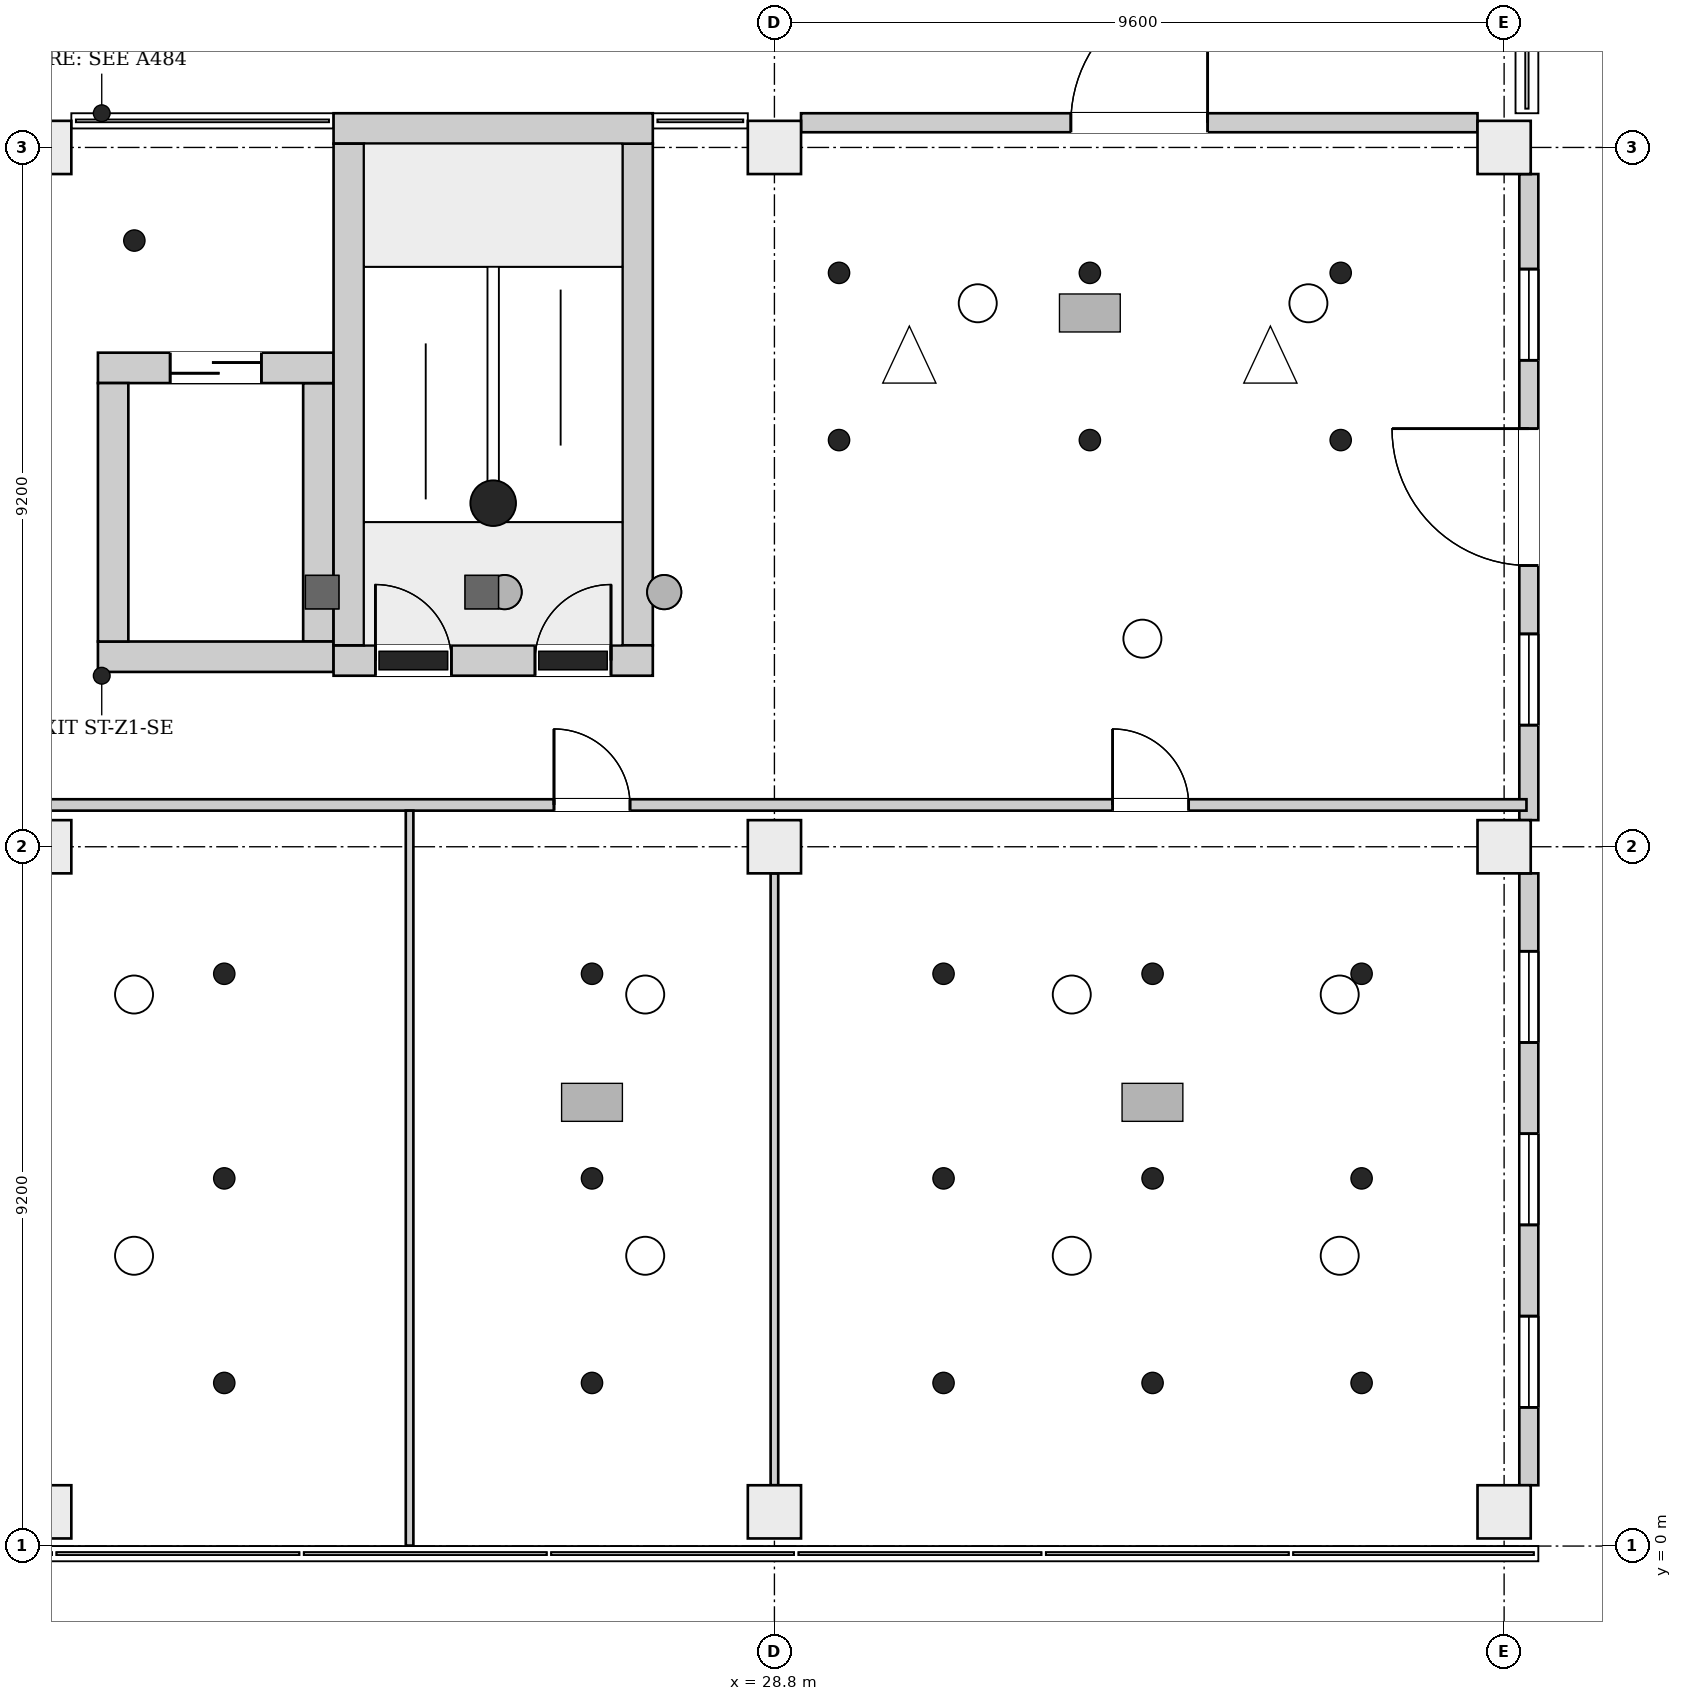
"""IFC4 building model, lengths in metres.
Left out: names, types, materials, properties, quantities, classifications, styles, units other than length and angle.
Written with IfcOpenShell. Run it as: python <this file> out.ifc"""

import sys

from ifc_helpers import new_model, si_unit, direction, frame, frame_2d, origin, origin_2d, place, context, subcontext, project, spatial, rectangle, extrude, element, fill, save


model = new_model("IFC4")
c1 = context("Model", 3, precision=1e-05, world=origin(), true_north=direction((0.0, 1.0)))
c2 = subcontext(c1, "Body", "Model", "MODEL_VIEW")
j1 = project(units=[si_unit("LENGTHUNIT", "METRE"), si_unit("PLANEANGLEUNIT", "RADIAN")], contexts=[c1])
p1 = place(None, origin())
s1 = spatial("IfcSite", under=j1, at=p1, CompositionType="ELEMENT")
p2 = place(p1, origin())
s2 = spatial("IfcBuilding", under=s1, at=p2, CompositionType="ELEMENT")
p3 = place(p2, frame((0.0, 0.0, 69.7)))
s3 = spatial("IfcBuildingStorey", under=s2, at=p3, CompositionType="ELEMENT", Elevation=69.7)
p4 = place(p3, frame((23.0, 11.65, 0.0), z_axis=(0.0, 0.0, 1.0), x_axis=(1.0, 0.0, 0.0)))
e1 = element("IfcWall", 1, at=p4, inside=s3, PredefinedType="SHEAR", context=c2, shape_type="SweptSolid", body=[
    extrude(rectangle(XDim=4.2, YDim=0.4, at=frame_2d((2.1, 0.0))), origin(), (0.0, 0.0, 1.0), 4.2),
])
p5 = place(p4, frame((0.55, 0.0, 0.0)))
e2 = element("IfcOpeningElement", 2, at=p5, cuts=e1, PredefinedType="OPENING", context=c2, shape_type="SweptSolid", body=[
    extrude(rectangle(XDim=1.0, YDim=2.1, at=frame_2d((0.5, 1.05))), frame((0.0, 0.21, 0.0), z_axis=(0.0, -1.0, 0.0), x_axis=(1.0, 0.0, 0.0)), (0.0, 0.0, 1.0), 0.42),
])
p6 = place(p4, frame((2.65, 0.0, 0.0)))
e3 = element("IfcOpeningElement", 3, at=p6, cuts=e1, PredefinedType="OPENING", context=c2, shape_type="SweptSolid", body=[
    extrude(rectangle(XDim=1.0, YDim=2.1, at=frame_2d((0.5, 1.05))), frame((0.0, 0.21, 0.0), z_axis=(0.0, -1.0, 0.0), x_axis=(1.0, 0.0, 0.0)), (0.0, 0.0, 1.0), 0.42),
])
p7 = place(p3, frame((23.0, 18.65, 0.0), z_axis=(0.0, 0.0, 1.0), x_axis=(1.0, 0.0, 0.0)))
e4 = element("IfcWall", 4, at=p7, inside=s3, PredefinedType="SHEAR", context=c2, shape_type="SweptSolid", body=[
    extrude(rectangle(XDim=4.2, YDim=0.4, at=frame_2d((2.1, 0.0))), origin(), (0.0, 0.0, 1.0), 4.2),
])
for number, where, z_axis, x_axis in (
    (5, (23.2, 11.85, 0.0), (0.0, 0.0, 1.0), (0.0, 1.0, 0.0)),
    (6, (27.0, 11.85, 0.0), (0.0, 0.0, 1.0), (0.0, 1.0, 0.0)),
):
    element("IfcWall", number, at=place(p3, frame(where, z_axis=z_axis, x_axis=x_axis)), inside=s3, PredefinedType="SHEAR", context=c2, shape_type="SweptSolid", body=[
        extrude(rectangle(XDim=6.6, YDim=0.4, at=frame_2d((3.3, 0.0))), origin(), (0.0, 0.0, 1.0), 4.2),
    ])
p8 = place(p3, frame((19.9, 11.7, 0.0), z_axis=(0.0, 0.0, 1.0), x_axis=(1.0, 0.0, 0.0)))
e7 = element("IfcWall", 7, at=p8, inside=s3, PredefinedType="SHEAR", context=c2, shape_type="SweptSolid", body=[
    extrude(rectangle(XDim=3.1, YDim=0.4, at=frame_2d((1.55, 0.0))), origin(), (0.0, 0.0, 1.0), 4.2),
])
p9 = place(p3, frame((19.9, 15.5, 0.0), z_axis=(0.0, 0.0, 1.0), x_axis=(1.0, 0.0, 0.0)))
e8 = element("IfcWall", 8, at=p9, inside=s3, PredefinedType="SHEAR", context=c2, shape_type="SweptSolid", body=[
    extrude(rectangle(XDim=3.1, YDim=0.4, at=frame_2d((1.55, 0.0))), origin(), (0.0, 0.0, 1.0), 4.2),
])
p10 = place(p9, frame((0.95, 0.0, 0.0)))
e9 = element("IfcOpeningElement", 9, at=p10, cuts=e8, PredefinedType="OPENING", context=c2, shape_type="SweptSolid", body=[
    extrude(rectangle(XDim=1.2, YDim=2.1, at=frame_2d((0.6, 1.05))), frame((0.0, 0.21, 0.0), z_axis=(0.0, -1.0, 0.0), x_axis=(1.0, 0.0, 0.0)), (0.0, 0.0, 1.0), 0.42),
])
for number, where, z_axis, x_axis in (
    (10, (20.1, 11.9, 0.0), (0.0, 0.0, 1.0), (0.0, 1.0, 0.0)),
    (11, (22.8, 11.9, 0.0), (0.0, 0.0, 1.0), (0.0, 1.0, 0.0)),
):
    element("IfcWall", number, at=place(p3, frame(where, z_axis=z_axis, x_axis=x_axis)), inside=s3, PredefinedType="SHEAR", context=c2, shape_type="SweptSolid", body=[
        extrude(rectangle(XDim=3.4, YDim=0.4, at=frame_2d((1.7, 0.0))), origin(), (0.0, 0.0, 1.0), 4.2),
    ])
for number, where, z_axis, x_axis in (
    (12, (19.2, 0.45, 0.0), (0.0, 0.0, 1.0), (1.0, 0.0, 0.0)),
    (13, (28.8, 0.45, 0.0), (0.0, 0.0, 1.0), (1.0, 0.0, 0.0)),
    (14, (38.4, 0.45, 0.0), (0.0, 0.0, 1.0), (1.0, 0.0, 0.0)),
    (15, (19.2, 9.2, 0.0), (0.0, 0.0, 1.0), (1.0, 0.0, 0.0)),
    (16, (28.8, 9.2, 0.0), (0.0, 0.0, 1.0), (1.0, 0.0, 0.0)),
    (17, (38.4, 9.2, 0.0), (0.0, 0.0, 1.0), (1.0, 0.0, 0.0)),
    (18, (19.2, 18.4, 0.0), (0.0, 0.0, 1.0), (1.0, 0.0, 0.0)),
    (19, (28.8, 18.4, 0.0), (0.0, 0.0, 1.0), (1.0, 0.0, 0.0)),
    (20, (38.4, 18.4, 0.0), (0.0, 0.0, 1.0), (1.0, 0.0, 0.0)),
):
    element("IfcColumn", number, at=place(p3, frame(where, z_axis=z_axis, x_axis=x_axis)), inside=s3, PredefinedType="COLUMN", context=c2, shape_type="SweptSolid", body=[
        extrude(rectangle(XDim=0.7, YDim=0.7, at=origin_2d()), origin(), (0.0, 0.0, 1.0), 4.2),
    ])
p11 = place(p3, frame((38.05, 18.725, 0.0), z_axis=(0.0, 0.0, 1.0), x_axis=(-1.0, 0.0, 0.0)))
e21 = element("IfcWall", 21, at=p11, inside=s3, PredefinedType="ELEMENTEDWALL", context=c2, shape_type="SweptSolid", body=[
    extrude(rectangle(XDim=8.9, YDim=0.25, at=frame_2d((4.45, 0.0))), origin(), (0.0, 0.0, 1.0), 3.9),
])
p12 = place(p11, frame((3.55, 0.0, 0.0)))
e22 = element("IfcOpeningElement", 22, at=p12, cuts=e21, PredefinedType="OPENING", context=c2, shape_type="SweptSolid", body=[
    extrude(rectangle(XDim=1.8, YDim=2.4, at=frame_2d((0.9, 1.2))), frame((0.0, 0.135, 0.0), z_axis=(0.0, -1.0, 0.0), x_axis=(1.0, 0.0, 0.0)), (0.0, 0.0, 1.0), 0.27),
])
p13 = place(p3, frame((38.725, 0.8, 0.0), z_axis=(0.0, 0.0, 1.0), x_axis=(0.0, 1.0, 0.0)))
e23 = element("IfcWall", 23, at=p13, inside=s3, PredefinedType="ELEMENTEDWALL", context=c2, shape_type="SweptSolid", body=[
    extrude(rectangle(XDim=8.05, YDim=0.25, at=frame_2d((4.025, 0.0))), origin(), (0.0, 0.0, 1.0), 3.9),
])
p14 = place(p13, frame((1.025, 0.0, 0.9)))
e24 = element("IfcOpeningElement", 24, at=p14, cuts=e23, PredefinedType="OPENING", context=c2, shape_type="SweptSolid", body=[
    extrude(rectangle(XDim=1.2, YDim=2.6, at=frame_2d((0.6, 1.3))), frame((0.0, 0.135, 0.0), z_axis=(0.0, -1.0, 0.0), x_axis=(1.0, 0.0, 0.0)), (0.0, 0.0, 1.0), 0.27),
])
p15 = place(p13, frame((3.425, 0.0, 0.9)))
e25 = element("IfcOpeningElement", 25, at=p15, cuts=e23, PredefinedType="OPENING", context=c2, shape_type="SweptSolid", body=[
    extrude(rectangle(XDim=1.2, YDim=2.6, at=frame_2d((0.6, 1.3))), frame((0.0, 0.135, 0.0), z_axis=(0.0, -1.0, 0.0), x_axis=(1.0, 0.0, 0.0)), (0.0, 0.0, 1.0), 0.27),
])
p16 = place(p13, frame((5.825, 0.0, 0.9)))
e26 = element("IfcOpeningElement", 26, at=p16, cuts=e23, PredefinedType="OPENING", context=c2, shape_type="SweptSolid", body=[
    extrude(rectangle(XDim=1.2, YDim=2.6, at=frame_2d((0.6, 1.3))), frame((0.0, 0.135, 0.0), z_axis=(0.0, -1.0, 0.0), x_axis=(1.0, 0.0, 0.0)), (0.0, 0.0, 1.0), 0.27),
])
p17 = place(p3, frame((38.725, 9.55, 0.0), z_axis=(0.0, 0.0, 1.0), x_axis=(0.0, 1.0, 0.0)))
e27 = element("IfcWall", 27, at=p17, inside=s3, PredefinedType="ELEMENTEDWALL", context=c2, shape_type="SweptSolid", body=[
    extrude(rectangle(XDim=8.5, YDim=0.25, at=frame_2d((4.25, 0.0))), origin(), (0.0, 0.0, 1.0), 3.9),
])
p18 = place(p17, frame((3.35, 0.0, 0.0)))
e28 = element("IfcOpeningElement", 28, at=p18, cuts=e27, PredefinedType="OPENING", context=c2, shape_type="SweptSolid", body=[
    extrude(rectangle(XDim=1.8, YDim=2.4, at=frame_2d((0.9, 1.2))), frame((0.0, 0.135, 0.0), z_axis=(0.0, -1.0, 0.0), x_axis=(1.0, 0.0, 0.0)), (0.0, 0.0, 1.0), 0.27),
])
p19 = place(p17, frame((1.25, 0.0, 0.9)))
e29 = element("IfcOpeningElement", 29, at=p19, cuts=e27, PredefinedType="OPENING", context=c2, shape_type="SweptSolid", body=[
    extrude(rectangle(XDim=1.2, YDim=2.6, at=frame_2d((0.6, 1.3))), frame((0.0, 0.135, 0.0), z_axis=(0.0, -1.0, 0.0), x_axis=(1.0, 0.0, 0.0)), (0.0, 0.0, 1.0), 0.27),
])
p20 = place(p17, frame((6.05, 0.0, 0.9)))
e30 = element("IfcOpeningElement", 30, at=p20, cuts=e27, PredefinedType="OPENING", context=c2, shape_type="SweptSolid", body=[
    extrude(rectangle(XDim=1.2, YDim=2.6, at=frame_2d((0.6, 1.3))), frame((0.0, 0.135, 0.0), z_axis=(0.0, -1.0, 0.0), x_axis=(1.0, 0.0, 0.0)), (0.0, 0.0, 1.0), 0.27),
])
p21 = place(p3, frame((4.325, 9.75, 0.0), z_axis=(0.0, 0.0, 1.0), x_axis=(1.0, 0.0, 0.0)))
e31 = element("IfcWall", 31, at=p21, inside=s3, PredefinedType="PARTITIONING", context=c2, shape_type="SweptSolid", body=[
    extrude(rectangle(XDim=34.369, YDim=0.15, at=frame_2d((17.185, 0.0))), origin(), (0.0, 0.0, 1.0), 3.9),
])
p22 = place(p21, frame((2.175, 0.0, 0.0)))
e32 = element("IfcOpeningElement", 32, at=p22, cuts=e31, PredefinedType="OPENING", context=c2, shape_type="SweptSolid", body=[
    extrude(rectangle(XDim=1.0, YDim=2.1, at=frame_2d((0.5, 1.05))), frame((0.0, 0.085, 0.0), z_axis=(0.0, -1.0, 0.0), x_axis=(1.0, 0.0, 0.0)), (0.0, 0.0, 1.0), 0.17),
])
p23 = place(p21, frame((11.975, 0.0, 0.0)))
e33 = element("IfcOpeningElement", 33, at=p23, cuts=e31, PredefinedType="OPENING", context=c2, shape_type="SweptSolid", body=[
    extrude(rectangle(XDim=1.0, YDim=2.1, at=frame_2d((0.5, 1.05))), frame((0.0, 0.085, 0.0), z_axis=(0.0, -1.0, 0.0), x_axis=(1.0, 0.0, 0.0)), (0.0, 0.0, 1.0), 0.17),
])
p24 = place(p21, frame((21.575, 0.0, 0.0)))
e34 = element("IfcOpeningElement", 34, at=p24, cuts=e31, PredefinedType="OPENING", context=c2, shape_type="SweptSolid", body=[
    extrude(rectangle(XDim=1.0, YDim=2.1, at=frame_2d((0.5, 1.05))), frame((0.0, 0.085, 0.0), z_axis=(0.0, -1.0, 0.0), x_axis=(1.0, 0.0, 0.0)), (0.0, 0.0, 1.0), 0.17),
])
p25 = place(p21, frame((28.925, 0.0, 0.0)))
e35 = element("IfcOpeningElement", 35, at=p25, cuts=e31, PredefinedType="OPENING", context=c2, shape_type="SweptSolid", body=[
    extrude(rectangle(XDim=1.0, YDim=2.1, at=frame_2d((0.5, 1.05))), frame((0.0, 0.085, 0.0), z_axis=(0.0, -1.0, 0.0), x_axis=(1.0, 0.0, 0.0)), (0.0, 0.0, 1.0), 0.17),
])
p26 = place(p3, frame((24.0, 0.006, 0.0), z_axis=(0.0, 0.0, 1.0), x_axis=(0.0, 1.0, 0.0)))
e36 = element("IfcWall", 36, at=p26, inside=s3, PredefinedType="PARTITIONING", context=c2, shape_type="SweptSolid", body=[
    extrude(rectangle(XDim=9.669, YDim=0.1, at=frame_2d((4.834, 0.0))), origin(), (0.0, 0.0, 1.0), 3.9),
])
p27 = place(p3, frame((28.8, 0.8, 0.0), z_axis=(0.0, 0.0, 1.0), x_axis=(0.0, 1.0, 0.0)))
e37 = element("IfcWall", 37, at=p27, inside=s3, PredefinedType="PARTITIONING", context=c2, shape_type="SweptSolid", body=[
    extrude(rectangle(XDim=8.05, YDim=0.1, at=frame_2d((4.025, 0.0))), origin(), (0.0, 0.0, 1.0), 3.9),
])
p28 = place(p12, frame((1.8, 0.0, 0.0), z_axis=(0.0, 0.0, 1.0), x_axis=(-1.0, 0.0, 0.0)))
e38 = element("IfcDoor", 38, at=p28, inside=s3, OperationType="DOUBLE_DOOR_SINGLE_SWING", PredefinedType="DOOR", context=c2, shape_type="SweptSolid", body=[
    extrude(rectangle(XDim=1.8, YDim=2.4, at=frame_2d((0.9, 1.2))), frame((0.0, 0.025, 0.0), z_axis=(0.0, -1.0, 0.0), x_axis=(1.0, 0.0, 0.0)), (0.0, 0.0, 1.0), 0.05),
])
fill(e22, e38)
p29 = place(p14, origin())
e39 = element("IfcWindow", 39, at=p29, inside=s3, PartitioningType="SINGLE_PANEL", PredefinedType="WINDOW", context=c2, shape_type="SweptSolid", body=[
    extrude(rectangle(XDim=1.2, YDim=2.6, at=frame_2d((0.6, 1.3))), frame((0.0, 0.03, 0.0), z_axis=(0.0, -1.0, 0.0), x_axis=(1.0, 0.0, 0.0)), (0.0, 0.0, 1.0), 0.06),
])
fill(e24, e39)
p30 = place(p15, origin())
e40 = element("IfcWindow", 40, at=p30, inside=s3, PartitioningType="SINGLE_PANEL", PredefinedType="WINDOW", context=c2, shape_type="SweptSolid", body=[
    extrude(rectangle(XDim=1.2, YDim=2.6, at=frame_2d((0.6, 1.3))), frame((0.0, 0.03, 0.0), z_axis=(0.0, -1.0, 0.0), x_axis=(1.0, 0.0, 0.0)), (0.0, 0.0, 1.0), 0.06),
])
fill(e25, e40)
p31 = place(p16, origin())
e41 = element("IfcWindow", 41, at=p31, inside=s3, PartitioningType="SINGLE_PANEL", PredefinedType="WINDOW", context=c2, shape_type="SweptSolid", body=[
    extrude(rectangle(XDim=1.2, YDim=2.6, at=frame_2d((0.6, 1.3))), frame((0.0, 0.03, 0.0), z_axis=(0.0, -1.0, 0.0), x_axis=(1.0, 0.0, 0.0)), (0.0, 0.0, 1.0), 0.06),
])
fill(e26, e41)
p32 = place(p18, frame((1.8, 0.0, 0.0), z_axis=(0.0, 0.0, 1.0), x_axis=(-1.0, 0.0, 0.0)))
e42 = element("IfcDoor", 42, at=p32, inside=s3, OperationType="DOUBLE_DOOR_SINGLE_SWING", PredefinedType="DOOR", context=c2, shape_type="SweptSolid", body=[
    extrude(rectangle(XDim=1.8, YDim=2.4, at=frame_2d((0.9, 1.2))), frame((0.0, 0.025, 0.0), z_axis=(0.0, -1.0, 0.0), x_axis=(1.0, 0.0, 0.0)), (0.0, 0.0, 1.0), 0.05),
])
fill(e28, e42)
p33 = place(p19, origin())
e43 = element("IfcWindow", 43, at=p33, inside=s3, PartitioningType="SINGLE_PANEL", PredefinedType="WINDOW", context=c2, shape_type="SweptSolid", body=[
    extrude(rectangle(XDim=1.2, YDim=2.6, at=frame_2d((0.6, 1.3))), frame((0.0, 0.03, 0.0), z_axis=(0.0, -1.0, 0.0), x_axis=(1.0, 0.0, 0.0)), (0.0, 0.0, 1.0), 0.06),
])
fill(e29, e43)
p34 = place(p20, origin())
e44 = element("IfcWindow", 44, at=p34, inside=s3, PartitioningType="SINGLE_PANEL", PredefinedType="WINDOW", context=c2, shape_type="SweptSolid", body=[
    extrude(rectangle(XDim=1.2, YDim=2.6, at=frame_2d((0.6, 1.3))), frame((0.0, 0.03, 0.0), z_axis=(0.0, -1.0, 0.0), x_axis=(1.0, 0.0, 0.0)), (0.0, 0.0, 1.0), 0.06),
])
fill(e30, e44)
p35 = place(p5, origin())
e45 = element("IfcDoor", 45, at=p35, inside=s3, OperationType="SINGLE_SWING_RIGHT", PredefinedType="DOOR", context=c2, shape_type="SweptSolid", body=[
    extrude(rectangle(XDim=1.0, YDim=2.1, at=frame_2d((0.5, 1.05))), frame((0.0, 0.025, 0.0), z_axis=(0.0, -1.0, 0.0), x_axis=(1.0, 0.0, 0.0)), (0.0, 0.0, 1.0), 0.05),
])
fill(e2, e45)
p36 = place(p6, origin())
e46 = element("IfcDoor", 46, at=p36, inside=s3, OperationType="SINGLE_SWING_LEFT", PredefinedType="DOOR", context=c2, shape_type="SweptSolid", body=[
    extrude(rectangle(XDim=1.0, YDim=2.1, at=frame_2d((0.5, 1.05))), frame((0.0, 0.025, 0.0), z_axis=(0.0, -1.0, 0.0), x_axis=(1.0, 0.0, 0.0)), (0.0, 0.0, 1.0), 0.05),
])
fill(e3, e46)
p37 = place(p10, origin())
e47 = element("IfcDoor", 47, at=p37, inside=s3, OperationType="DOUBLE_DOOR_SLIDING", PredefinedType="DOOR", context=c2, shape_type="SweptSolid", body=[
    extrude(rectangle(XDim=1.2, YDim=2.1, at=frame_2d((0.6, 1.05))), frame((0.0, 0.025, 0.0), z_axis=(0.0, -1.0, 0.0), x_axis=(1.0, 0.0, 0.0)), (0.0, 0.0, 1.0), 0.05),
])
fill(e9, e47)
p38 = place(p24, origin())
e48 = element("IfcDoor", 48, at=p38, inside=s3, OperationType="SINGLE_SWING_LEFT", PredefinedType="DOOR", context=c2, shape_type="SweptSolid", body=[
    extrude(rectangle(XDim=1.0, YDim=2.1, at=frame_2d((0.5, 1.05))), frame((0.0, 0.025, 0.0), z_axis=(0.0, -1.0, 0.0), x_axis=(1.0, 0.0, 0.0)), (0.0, 0.0, 1.0), 0.05),
])
fill(e34, e48)
p39 = place(p25, origin())
e49 = element("IfcDoor", 49, at=p39, inside=s3, OperationType="SINGLE_SWING_LEFT", PredefinedType="DOOR", context=c2, shape_type="SweptSolid", body=[
    extrude(rectangle(XDim=1.0, YDim=2.1, at=frame_2d((0.5, 1.05))), frame((0.0, 0.025, 0.0), z_axis=(0.0, -1.0, 0.0), x_axis=(1.0, 0.0, 0.0)), (0.0, 0.0, 1.0), 0.05),
])
fill(e35, e49)
save(model, sys.argv[1])
